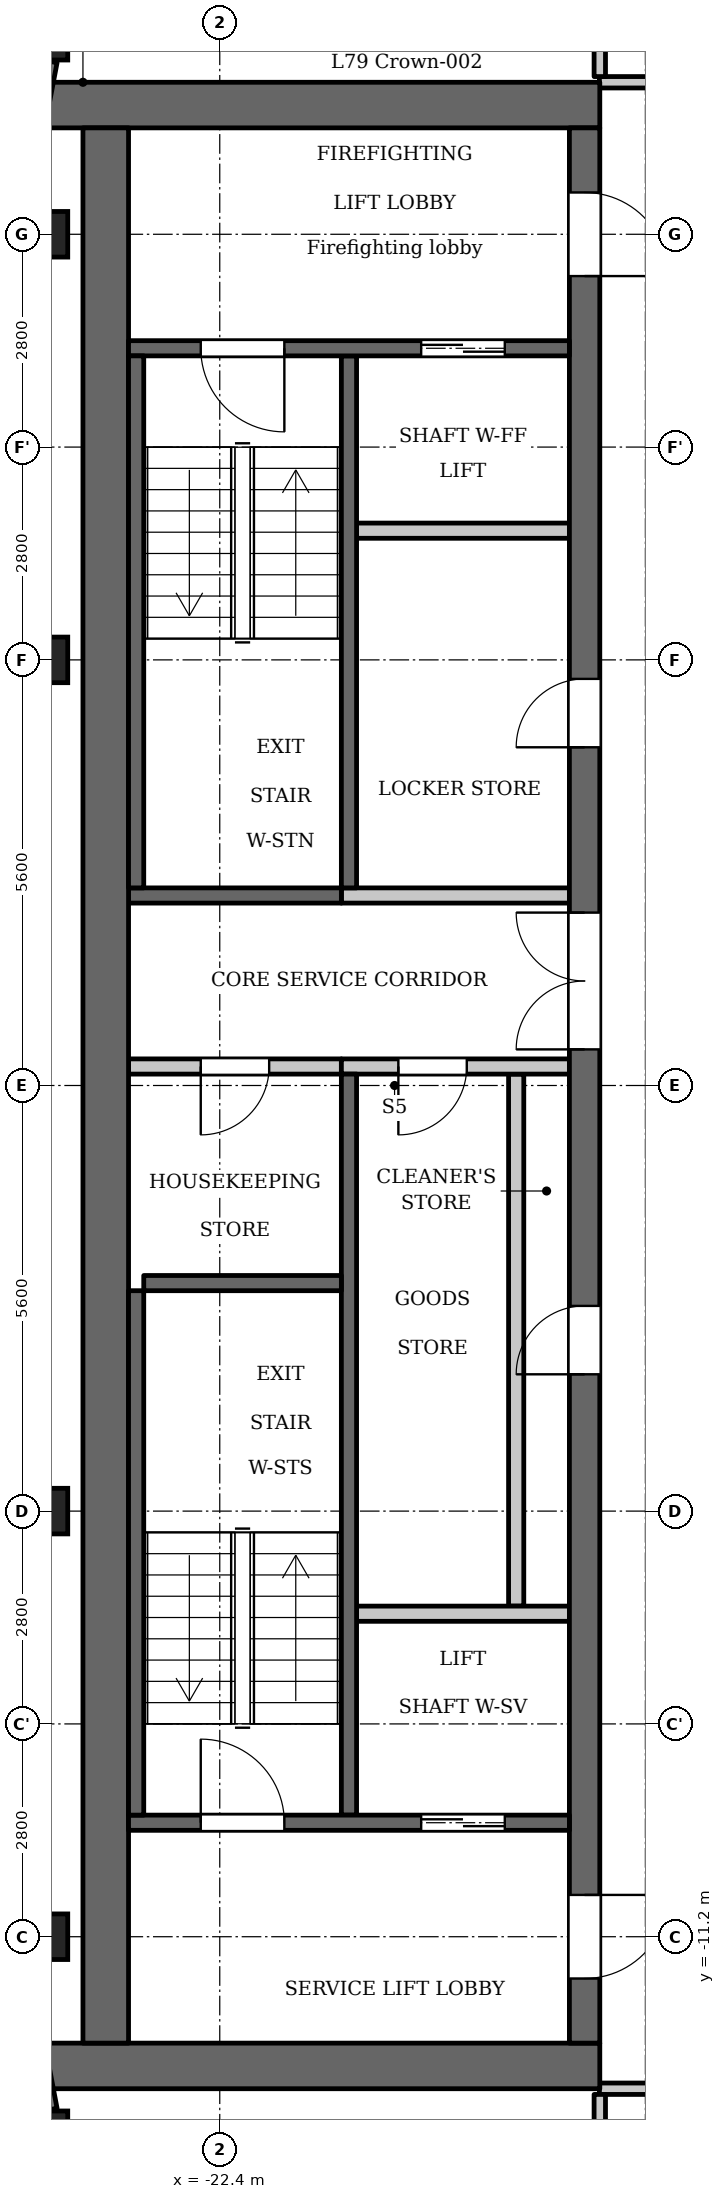
"""IFC4 building model, lengths in metres.
Left out: names, types, materials, properties, quantities, classifications, styles, units other than length and angle.
Written with IfcOpenShell. Run it as: python <this file> out.ifc"""

import sys

from ifc_helpers import new_model, si_unit, direction, frame, frame_2d, origin, origin_2d, place, context, subcontext, project, spatial, rectangle, extrude, element, fill, save


model = new_model("IFC4")
c1 = context("Model", 3, precision=1e-05, world=origin(), true_north=direction((0.0, 1.0)))
c2 = subcontext(c1, "Body", "Model", "MODEL_VIEW")
j1 = project(units=[si_unit("LENGTHUNIT", "METRE"), si_unit("PLANEANGLEUNIT", "RADIAN")], contexts=[c1])
p1 = place(None, origin())
s1 = spatial("IfcSite", under=j1, at=p1, CompositionType="ELEMENT")
p2 = place(p1, origin())
s2 = spatial("IfcBuilding", under=s1, at=p2, CompositionType="ELEMENT")
p3 = place(p2, frame((0.0, 0.0, 306.9)))
s3 = spatial("IfcBuildingStorey", under=s2, at=p3, CompositionType="ELEMENT", Elevation=306.9)
for number, where, z_axis, x_axis in (
    (1, (-24.7, -13.793, 0.0), (0.0, 0.0, 1.0), (1.0, 0.0, 0.0)),
    (2, (-24.7, -11.2, 0.0), (0.0, 0.0, 1.0), (1.0, 0.0, 0.0)),
    (3, (-24.7, -5.6, 0.0), (0.0, 0.0, 1.0), (1.0, 0.0, 0.0)),
    (4, (-24.7, 5.6, 0.0), (0.0, 0.0, 1.0), (1.0, 0.0, 0.0)),
    (5, (-24.7, 11.2, 0.0), (0.0, 0.0, 1.0), (1.0, 0.0, 0.0)),
    (6, (-24.7, 13.793, 0.0), (0.0, 0.0, 1.0), (1.0, 0.0, 0.0)),
):
    element("IfcColumn", number, at=place(p3, frame(where, z_axis=z_axis, x_axis=x_axis)), inside=s3, PredefinedType="COLUMN", context=c2, shape_type="SweptSolid", body=[
        extrude(rectangle(XDim=0.6, YDim=0.6, at=origin_2d()), origin(), (0.0, 0.0, 1.0), 3.5),
    ])
for number, where, z_axis, x_axis in (
    (7, (-24.688, 13.485, 0.0), (0.0, 0.0, 1.0), (-0.187, -0.982, 0.0)),
    (8, (-25.052, -11.573, 0.0), (0.0, 0.0, 1.0), (0.187, -0.982, 0.0)),
):
    element("IfcWall", number, at=place(p3, frame(where, z_axis=z_axis, x_axis=x_axis)), inside=s3, PredefinedType="SOLIDWALL", context=c2, shape_type="SweptSolid", body=[
        extrude(rectangle(XDim=1.947, YDim=0.3, at=frame_2d((0.973, 0.0))), origin(), (0.0, 0.0, 1.0), 2.6),
    ])
p4 = place(p3, frame((-20.7, 2.6, 0.0), z_axis=(0.0, 0.0, 1.0), x_axis=(0.0, 1.0, 0.0)))
e9 = element("IfcWall", 9, at=p4, inside=s3, PredefinedType="SHEAR", context=c2, shape_type="SweptSolid", body=[
    extrude(rectangle(XDim=7.0, YDim=0.2, at=frame_2d((3.5, 0.0))), origin(), (0.0, 0.0, 1.0), 3.2),
])
p5 = place(p3, frame((-20.7, -9.6, 0.0), z_axis=(0.0, 0.0, 1.0), x_axis=(0.0, 1.0, 0.0)))
e10 = element("IfcWall", 10, at=p5, inside=s3, PredefinedType="SHEAR", context=c2, shape_type="SweptSolid", body=[
    extrude(rectangle(XDim=9.75, YDim=0.2, at=frame_2d((4.875, 0.0))), origin(), (0.0, 0.0, 1.0), 3.2),
])
p6 = place(p3, frame((-20.8, 2.5, 0.0), z_axis=(0.0, 0.0, 1.0), x_axis=(-1.0, 0.0, 0.0)))
e11 = element("IfcWall", 11, at=p6, inside=s3, PredefinedType="SHEAR", context=c2, shape_type="SweptSolid", body=[
    extrude(rectangle(XDim=2.8, YDim=0.2, at=frame_2d((1.4, 0.0))), origin(), (0.0, 0.0, 1.0), 3.2),
])
p7 = place(p3, frame((-20.8, 0.25, 0.0), z_axis=(0.0, 0.0, 1.0), x_axis=(-1.0, 0.0, 0.0)))
e12 = element("IfcWall", 12, at=p7, inside=s3, PredefinedType="PARTITIONING", context=c2, shape_type="SweptSolid", body=[
    extrude(rectangle(XDim=2.8, YDim=0.2, at=frame_2d((1.4, 0.0))), origin(), (0.0, 0.0, 1.0), 3.2),
])
p8 = place(p7, frame((0.95, 0.0, 0.0)))
e13 = element("IfcOpeningElement", 13, at=p8, cuts=e12, PredefinedType="OPENING", context=c2, shape_type="SweptSolid", body=[
    extrude(rectangle(XDim=0.9, YDim=2.1, at=frame_2d((0.45, 1.05))), frame((0.0, 0.11, 0.0), z_axis=(0.0, -1.0, 0.0), x_axis=(1.0, 0.0, 0.0)), (0.0, 0.0, 1.0), 0.22),
])
for number, where, z_axis, x_axis in (
    (14, (-17.4, 12.9, 0.0), (0.0, 0.0, 1.0), (-1.0, 0.0, 0.0)),
    (15, (-17.4, -12.9, 0.0), (0.0, 0.0, 1.0), (-1.0, 0.0, 0.0)),
):
    element("IfcWall", number, at=place(p3, frame(where, z_axis=z_axis, x_axis=x_axis)), inside=s3, PredefinedType="SHEAR", context=c2, shape_type="SweptSolid", body=[
        extrude(rectangle(XDim=7.6, YDim=0.6, at=frame_2d((3.8, 0.0))), origin(), (0.0, 0.0, 1.0), 3.2),
    ])
p9 = place(p3, frame((-18.5, -6.85, 0.0), z_axis=(0.0, 0.0, 1.0), x_axis=(0.0, 1.0, 0.0)))
e16 = element("IfcWall", 16, at=p9, inside=s3, PredefinedType="PARTITIONING", context=c2, shape_type="SweptSolid", body=[
    extrude(rectangle(XDim=7.0, YDim=0.2, at=frame_2d((3.5, 0.0))), origin(), (0.0, 0.0, 1.0), 3.2),
])
p10 = place(p3, frame((-17.6, -12.6, 0.0), z_axis=(0.0, 0.0, 1.0), x_axis=(0.0, 1.0, 0.0)))
e17 = element("IfcWall", 17, at=p10, inside=s3, PredefinedType="SHEAR", context=c2, shape_type="SweptSolid", body=[
    extrude(rectangle(XDim=25.2, YDim=0.4, at=frame_2d((12.6, 0.0))), origin(), (0.0, 0.0, 1.0), 3.2),
])
p11 = place(p10, frame((8.8, 0.0, 0.0)))
e18 = element("IfcOpeningElement", 18, at=p11, cuts=e17, PredefinedType="OPENING", context=c2, shape_type="SweptSolid", body=[
    extrude(rectangle(XDim=0.9, YDim=2.1, at=frame_2d((0.45, 1.05))), frame((0.0, 0.21, 0.0), z_axis=(0.0, -1.0, 0.0), x_axis=(1.0, 0.0, 0.0)), (0.0, 0.0, 1.0), 0.42),
])
p12 = place(p10, frame((17.05, 0.0, 0.0)))
e19 = element("IfcOpeningElement", 19, at=p12, cuts=e17, PredefinedType="OPENING", context=c2, shape_type="SweptSolid", body=[
    extrude(rectangle(XDim=0.9, YDim=2.1, at=frame_2d((0.45, 1.05))), frame((0.0, 0.21, 0.0), z_axis=(0.0, -1.0, 0.0), x_axis=(1.0, 0.0, 0.0)), (0.0, 0.0, 1.0), 0.42),
])
p13 = place(p10, frame((23.25, 0.0, 0.0)))
e20 = element("IfcOpeningElement", 20, at=p13, cuts=e17, PredefinedType="OPENING", context=c2, shape_type="SweptSolid", body=[
    extrude(rectangle(XDim=1.1, YDim=2.1, at=frame_2d((0.55, 1.05))), frame((0.0, 0.21, 0.0), z_axis=(0.0, -1.0, 0.0), x_axis=(1.0, 0.0, 0.0)), (0.0, 0.0, 1.0), 0.42),
])
p14 = place(p10, frame((0.85, 0.0, 0.0)))
e21 = element("IfcOpeningElement", 21, at=p14, cuts=e17, PredefinedType="OPENING", context=c2, shape_type="SweptSolid", body=[
    extrude(rectangle(XDim=1.1, YDim=2.1, at=frame_2d((0.55, 1.05))), frame((0.0, 0.21, 0.0), z_axis=(0.0, -1.0, 0.0), x_axis=(1.0, 0.0, 0.0)), (0.0, 0.0, 1.0), 0.42),
])
p15 = place(p10, frame((13.075, 0.0, 0.0)))
e22 = element("IfcOpeningElement", 22, at=p15, cuts=e17, PredefinedType="OPENING", context=c2, shape_type="SweptSolid", body=[
    extrude(rectangle(XDim=1.8, YDim=2.1, at=frame_2d((0.9, 1.05))), frame((0.0, 0.21, 0.0), z_axis=(0.0, -1.0, 0.0), x_axis=(1.0, 0.0, 0.0)), (0.0, 0.0, 1.0), 0.42),
])
p16 = place(p3, frame((-23.9, -12.6, 0.0), z_axis=(0.0, 0.0, 1.0), x_axis=(0.0, 1.0, 0.0)))
e23 = element("IfcWall", 23, at=p16, inside=s3, PredefinedType="SHEAR", context=c2, shape_type="SweptSolid", body=[
    extrude(rectangle(XDim=25.2, YDim=0.6, at=frame_2d((12.6, 0.0))), origin(), (0.0, 0.0, 1.0), 3.2),
])
p17 = place(p3, frame((-17.8, -9.7, 0.0), z_axis=(0.0, 0.0, 1.0), x_axis=(-1.0, 0.0, 0.0)))
e24 = element("IfcWall", 24, at=p17, inside=s3, PredefinedType="SHEAR", context=c2, shape_type="SweptSolid", body=[
    extrude(rectangle(XDim=5.8, YDim=0.2, at=frame_2d((2.9, 0.0))), origin(), (0.0, 0.0, 1.0), 3.2),
])
p18 = place(p17, frame((0.85, 0.0, 0.0)))
e25 = element("IfcOpeningElement", 25, at=p18, cuts=e24, PredefinedType="OPENING", context=c2, shape_type="SweptSolid", body=[
    extrude(rectangle(XDim=1.1, YDim=2.1, at=frame_2d((0.55, 1.05))), frame((0.0, 0.11, 0.0), z_axis=(0.0, -1.0, 0.0), x_axis=(1.0, 0.0, 0.0)), (0.0, 0.0, 1.0), 0.22),
])
p19 = place(p17, frame((3.75, 0.0, 0.0)))
e26 = element("IfcOpeningElement", 26, at=p19, cuts=e24, PredefinedType="OPENING", context=c2, shape_type="SweptSolid", body=[
    extrude(rectangle(XDim=1.1, YDim=2.1, at=frame_2d((0.55, 1.05))), frame((0.0, 0.11, 0.0), z_axis=(0.0, -1.0, 0.0), x_axis=(1.0, 0.0, 0.0)), (0.0, 0.0, 1.0), 0.22),
])
p20 = place(p3, frame((-17.8, -6.95, 0.0), z_axis=(0.0, 0.0, 1.0), x_axis=(-1.0, 0.0, 0.0)))
e27 = element("IfcWall", 27, at=p20, inside=s3, PredefinedType="PARTITIONING", context=c2, shape_type="SweptSolid", body=[
    extrude(rectangle(XDim=2.8, YDim=0.2, at=frame_2d((1.4, 0.0))), origin(), (0.0, 0.0, 1.0), 3.2),
])
p21 = place(p3, frame((-17.8, 0.25, 0.0), z_axis=(0.0, 0.0, 1.0), x_axis=(-1.0, 0.0, 0.0)))
e28 = element("IfcWall", 28, at=p21, inside=s3, PredefinedType="PARTITIONING", context=c2, shape_type="SweptSolid", body=[
    extrude(rectangle(XDim=3.0, YDim=0.2, at=frame_2d((1.5, 0.0))), origin(), (0.0, 0.0, 1.0), 3.2),
])
p22 = place(p21, frame((1.35, 0.0, 0.0)))
e29 = element("IfcOpeningElement", 29, at=p22, cuts=e28, PredefinedType="OPENING", context=c2, shape_type="SweptSolid", body=[
    extrude(rectangle(XDim=0.9, YDim=2.1, at=frame_2d((0.45, 1.05))), frame((0.0, 0.11, 0.0), z_axis=(0.0, -1.0, 0.0), x_axis=(1.0, 0.0, 0.0)), (0.0, 0.0, 1.0), 0.22),
])
p23 = place(p3, frame((-17.8, 2.5, 0.0), z_axis=(0.0, 0.0, 1.0), x_axis=(-1.0, 0.0, 0.0)))
e30 = element("IfcWall", 30, at=p23, inside=s3, PredefinedType="PARTITIONING", context=c2, shape_type="SweptSolid", body=[
    extrude(rectangle(XDim=3.0, YDim=0.2, at=frame_2d((1.5, 0.0))), origin(), (0.0, 0.0, 1.0), 3.2),
])
p24 = place(p3, frame((-17.8, 7.3, 0.0), z_axis=(0.0, 0.0, 1.0), x_axis=(-1.0, 0.0, 0.0)))
e31 = element("IfcWall", 31, at=p24, inside=s3, PredefinedType="PARTITIONING", context=c2, shape_type="SweptSolid", body=[
    extrude(rectangle(XDim=2.8, YDim=0.2, at=frame_2d((1.4, 0.0))), origin(), (0.0, 0.0, 1.0), 3.2),
])
p25 = place(p3, frame((-17.8, 9.7, 0.0), z_axis=(0.0, 0.0, 1.0), x_axis=(-1.0, 0.0, 0.0)))
e32 = element("IfcWall", 32, at=p25, inside=s3, PredefinedType="SHEAR", context=c2, shape_type="SweptSolid", body=[
    extrude(rectangle(XDim=5.8, YDim=0.2, at=frame_2d((2.9, 0.0))), origin(), (0.0, 0.0, 1.0), 3.2),
])
p26 = place(p25, frame((0.85, 0.0, 0.0)))
e33 = element("IfcOpeningElement", 33, at=p26, cuts=e32, PredefinedType="OPENING", context=c2, shape_type="SweptSolid", body=[
    extrude(rectangle(XDim=1.1, YDim=2.1, at=frame_2d((0.55, 1.05))), frame((0.0, 0.11, 0.0), z_axis=(0.0, -1.0, 0.0), x_axis=(1.0, 0.0, 0.0)), (0.0, 0.0, 1.0), 0.22),
])
p27 = place(p25, frame((3.75, 0.0, 0.0)))
e34 = element("IfcOpeningElement", 34, at=p27, cuts=e32, PredefinedType="OPENING", context=c2, shape_type="SweptSolid", body=[
    extrude(rectangle(XDim=1.1, YDim=2.1, at=frame_2d((0.55, 1.05))), frame((0.0, 0.11, 0.0), z_axis=(0.0, -1.0, 0.0), x_axis=(1.0, 0.0, 0.0)), (0.0, 0.0, 1.0), 0.22),
])
p28 = place(p3, frame((-23.5, 2.6, 0.0), z_axis=(0.0, 0.0, 1.0), x_axis=(0.0, 1.0, 0.0)))
e35 = element("IfcWall", 35, at=p28, inside=s3, PredefinedType="SHEAR", context=c2, shape_type="SweptSolid", body=[
    extrude(rectangle(XDim=7.0, YDim=0.2, at=frame_2d((3.5, 0.0))), origin(), (0.0, 0.0, 1.0), 3.2),
])
p29 = place(p3, frame((-23.5, -9.6, 0.0), z_axis=(0.0, 0.0, 1.0), x_axis=(0.0, 1.0, 0.0)))
e36 = element("IfcWall", 36, at=p29, inside=s3, PredefinedType="SHEAR", context=c2, shape_type="SweptSolid", body=[
    extrude(rectangle(XDim=6.9, YDim=0.2, at=frame_2d((3.45, 0.0))), origin(), (0.0, 0.0, 1.0), 3.2),
])
p30 = place(p3, frame((-20.8, -2.6, 0.0), z_axis=(0.0, 0.0, 1.0), x_axis=(-1.0, 0.0, 0.0)))
e37 = element("IfcWall", 37, at=p30, inside=s3, PredefinedType="SHEAR", context=c2, shape_type="SweptSolid", body=[
    extrude(rectangle(XDim=2.6, YDim=0.2, at=frame_2d((1.3, 0.0))), origin(), (0.0, 0.0, 1.0), 3.2),
])
p31 = place(p3, frame((-17.405, -13.2, 0.0), z_axis=(0.0, 0.0, 1.0), x_axis=(1.0, 0.0, 0.0)))
e38 = element("IfcWall", 38, at=p31, inside=s3, PredefinedType="PARTITIONING", context=c2, shape_type="SweptSolid", body=[
    extrude(rectangle(XDim=2.085, YDim=0.15, at=frame_2d((1.042, 0.0))), origin(), (0.0, 0.0, 1.0), 3.2),
])
p32 = place(p31, frame((0.655, 0.0, 0.0)))
e39 = element("IfcOpeningElement", 39, at=p32, cuts=e38, PredefinedType="OPENING", context=c2, shape_type="SweptSolid", body=[
    extrude(rectangle(XDim=1.0, YDim=2.1, at=frame_2d((0.5, 1.05))), frame((0.0, 0.085, 0.0), z_axis=(0.0, -1.0, 0.0), x_axis=(1.0, 0.0, 0.0)), (0.0, 0.0, 1.0), 0.17),
])
p33 = place(p3, frame((-17.405, 13.2, 0.0), z_axis=(0.0, 0.0, 1.0), x_axis=(1.0, 0.0, 0.0)))
e40 = element("IfcWall", 40, at=p33, inside=s3, PredefinedType="PARTITIONING", context=c2, shape_type="SweptSolid", body=[
    extrude(rectangle(XDim=2.085, YDim=0.15, at=frame_2d((1.042, 0.0))), origin(), (0.0, 0.0, 1.0), 3.2),
])
p34 = place(p33, frame((0.665, 0.0, 0.0)))
e41 = element("IfcOpeningElement", 41, at=p34, cuts=e40, PredefinedType="OPENING", context=c2, shape_type="SweptSolid", body=[
    extrude(rectangle(XDim=1.0, YDim=2.1, at=frame_2d((0.5, 1.05))), frame((0.0, 0.085, 0.0), z_axis=(0.0, -1.0, 0.0), x_axis=(1.0, 0.0, 0.0)), (0.0, 0.0, 1.0), 0.17),
])
p35 = place(p3, frame((-17.4, -19.236, 0.0), z_axis=(0.0, 0.0, 1.0), x_axis=(0.0, 1.0, 0.0)))
e42 = element("IfcWall", 42, at=p35, inside=s3, PredefinedType="PARTITIONING", context=c2, shape_type="SweptSolid", body=[
    extrude(rectangle(XDim=5.961, YDim=0.15, at=frame_2d((2.981, 0.0))), origin(), (0.0, 0.0, 1.0), 3.2),
])
p36 = place(p35, frame((0.386, 0.0, 0.0)))
e43 = element("IfcOpeningElement", 43, at=p36, cuts=e42, PredefinedType="OPENING", context=c2, shape_type="SweptSolid", body=[
    extrude(rectangle(XDim=1.0, YDim=2.1, at=frame_2d((0.5, 1.05))), frame((0.0, 0.085, 0.0), z_axis=(0.0, -1.0, 0.0), x_axis=(1.0, 0.0, 0.0)), (0.0, 0.0, 1.0), 0.17),
])
p37 = place(p3, frame((-17.4, 13.275, 0.0), z_axis=(0.0, 0.0, 1.0), x_axis=(0.0, 1.0, 0.0)))
e44 = element("IfcWall", 44, at=p37, inside=s3, PredefinedType="PARTITIONING", context=c2, shape_type="SweptSolid", body=[
    extrude(rectangle(XDim=5.961, YDim=0.15, at=frame_2d((2.981, 0.0))), origin(), (0.0, 0.0, 1.0), 3.2),
])
p38 = place(p37, frame((1.045, 0.0, 0.0)))
e45 = element("IfcOpeningElement", 45, at=p38, cuts=e44, PredefinedType="OPENING", context=c2, shape_type="SweptSolid", body=[
    extrude(rectangle(XDim=1.0, YDim=2.1, at=frame_2d((0.5, 1.05))), frame((0.0, 0.085, 0.0), z_axis=(0.0, -1.0, 0.0), x_axis=(1.0, 0.0, 0.0)), (0.0, 0.0, 1.0), 0.17),
])
p39 = place(p18, origin())
e46 = element("IfcDoor", 46, at=p39, inside=s3, OperationType="DOUBLE_DOOR_SLIDING", PredefinedType="DOOR", context=c2, shape_type="SweptSolid", body=[
    extrude(rectangle(XDim=1.1, YDim=2.1, at=frame_2d((0.55, 1.05))), frame((0.0, 0.025, 0.0), z_axis=(0.0, -1.0, 0.0), x_axis=(1.0, 0.0, 0.0)), (0.0, 0.0, 1.0), 0.05),
])
fill(e25, e46)
p40 = place(p11, origin())
e47 = element("IfcDoor", 47, at=p40, inside=s3, OperationType="SINGLE_SWING_RIGHT", PredefinedType="DOOR", context=c2, shape_type="SweptSolid", body=[
    extrude(rectangle(XDim=0.9, YDim=2.1, at=frame_2d((0.45, 1.05))), frame((0.0, 0.025, 0.0), z_axis=(0.0, -1.0, 0.0), x_axis=(1.0, 0.0, 0.0)), (0.0, 0.0, 1.0), 0.05),
])
fill(e18, e47)
p41 = place(p22, origin())
e48 = element("IfcDoor", 48, at=p41, inside=s3, OperationType="SINGLE_SWING_LEFT", PredefinedType="DOOR", context=c2, shape_type="SweptSolid", body=[
    extrude(rectangle(XDim=0.9, YDim=2.1, at=frame_2d((0.45, 1.05))), frame((0.0, 0.025, 0.0), z_axis=(0.0, -1.0, 0.0), x_axis=(1.0, 0.0, 0.0)), (0.0, 0.0, 1.0), 0.05),
])
fill(e29, e48)
p42 = place(p12, origin())
e49 = element("IfcDoor", 49, at=p42, inside=s3, OperationType="SINGLE_SWING_RIGHT", PredefinedType="DOOR", context=c2, shape_type="SweptSolid", body=[
    extrude(rectangle(XDim=0.9, YDim=2.1, at=frame_2d((0.45, 1.05))), frame((0.0, 0.025, 0.0), z_axis=(0.0, -1.0, 0.0), x_axis=(1.0, 0.0, 0.0)), (0.0, 0.0, 1.0), 0.05),
])
fill(e19, e49)
p43 = place(p26, origin())
e50 = element("IfcDoor", 50, at=p43, inside=s3, OperationType="DOUBLE_DOOR_SLIDING", PredefinedType="DOOR", context=c2, shape_type="SweptSolid", body=[
    extrude(rectangle(XDim=1.1, YDim=2.1, at=frame_2d((0.55, 1.05))), frame((0.0, 0.025, 0.0), z_axis=(0.0, -1.0, 0.0), x_axis=(1.0, 0.0, 0.0)), (0.0, 0.0, 1.0), 0.05),
])
fill(e33, e50)
p44 = place(p13, origin())
e51 = element("IfcDoor", 51, at=p44, inside=s3, OperationType="SINGLE_SWING_LEFT", PredefinedType="DOOR", context=c2, shape_type="SweptSolid", body=[
    extrude(rectangle(XDim=1.1, YDim=2.1, at=frame_2d((0.55, 1.05))), frame((0.0, 0.025, 0.0), z_axis=(0.0, -1.0, 0.0), x_axis=(1.0, 0.0, 0.0)), (0.0, 0.0, 1.0), 0.05),
])
fill(e20, e51)
p45 = place(p14, origin())
e52 = element("IfcDoor", 52, at=p45, inside=s3, OperationType="SINGLE_SWING_RIGHT", PredefinedType="DOOR", context=c2, shape_type="SweptSolid", body=[
    extrude(rectangle(XDim=1.1, YDim=2.1, at=frame_2d((0.55, 1.05))), frame((0.0, 0.025, 0.0), z_axis=(0.0, -1.0, 0.0), x_axis=(1.0, 0.0, 0.0)), (0.0, 0.0, 1.0), 0.05),
])
fill(e21, e52)
p46 = place(p27, origin())
e53 = element("IfcDoor", 53, at=p46, inside=s3, OperationType="SINGLE_SWING_RIGHT", PredefinedType="DOOR", context=c2, shape_type="SweptSolid", body=[
    extrude(rectangle(XDim=1.1, YDim=2.1, at=frame_2d((0.55, 1.05))), frame((0.0, 0.025, 0.0), z_axis=(0.0, -1.0, 0.0), x_axis=(1.0, 0.0, 0.0)), (0.0, 0.0, 1.0), 0.05),
])
fill(e34, e53)
p47 = place(p19, origin())
e54 = element("IfcDoor", 54, at=p47, inside=s3, OperationType="SINGLE_SWING_RIGHT", PredefinedType="DOOR", context=c2, shape_type="SweptSolid", body=[
    extrude(rectangle(XDim=1.1, YDim=2.1, at=frame_2d((0.55, 1.05))), frame((0.0, 0.025, 0.0), z_axis=(0.0, -1.0, 0.0), x_axis=(1.0, 0.0, 0.0)), (0.0, 0.0, 1.0), 0.05),
])
fill(e26, e54)
p48 = place(p15, origin())
e55 = element("IfcDoor", 55, at=p48, inside=s3, OperationType="DOUBLE_DOOR_SINGLE_SWING", PredefinedType="DOOR", context=c2, shape_type="SweptSolid", body=[
    extrude(rectangle(XDim=1.8, YDim=2.1, at=frame_2d((0.9, 1.05))), frame((0.0, 0.025, 0.0), z_axis=(0.0, -1.0, 0.0), x_axis=(1.0, 0.0, 0.0)), (0.0, 0.0, 1.0), 0.05),
])
fill(e22, e55)
p49 = place(p8, origin())
e56 = element("IfcDoor", 56, at=p49, inside=s3, OperationType="SINGLE_SWING_LEFT", PredefinedType="DOOR", context=c2, shape_type="SweptSolid", body=[
    extrude(rectangle(XDim=0.9, YDim=2.1, at=frame_2d((0.45, 1.05))), frame((0.0, 0.025, 0.0), z_axis=(0.0, -1.0, 0.0), x_axis=(1.0, 0.0, 0.0)), (0.0, 0.0, 1.0), 0.05),
])
fill(e13, e56)
save(model, sys.argv[1])
